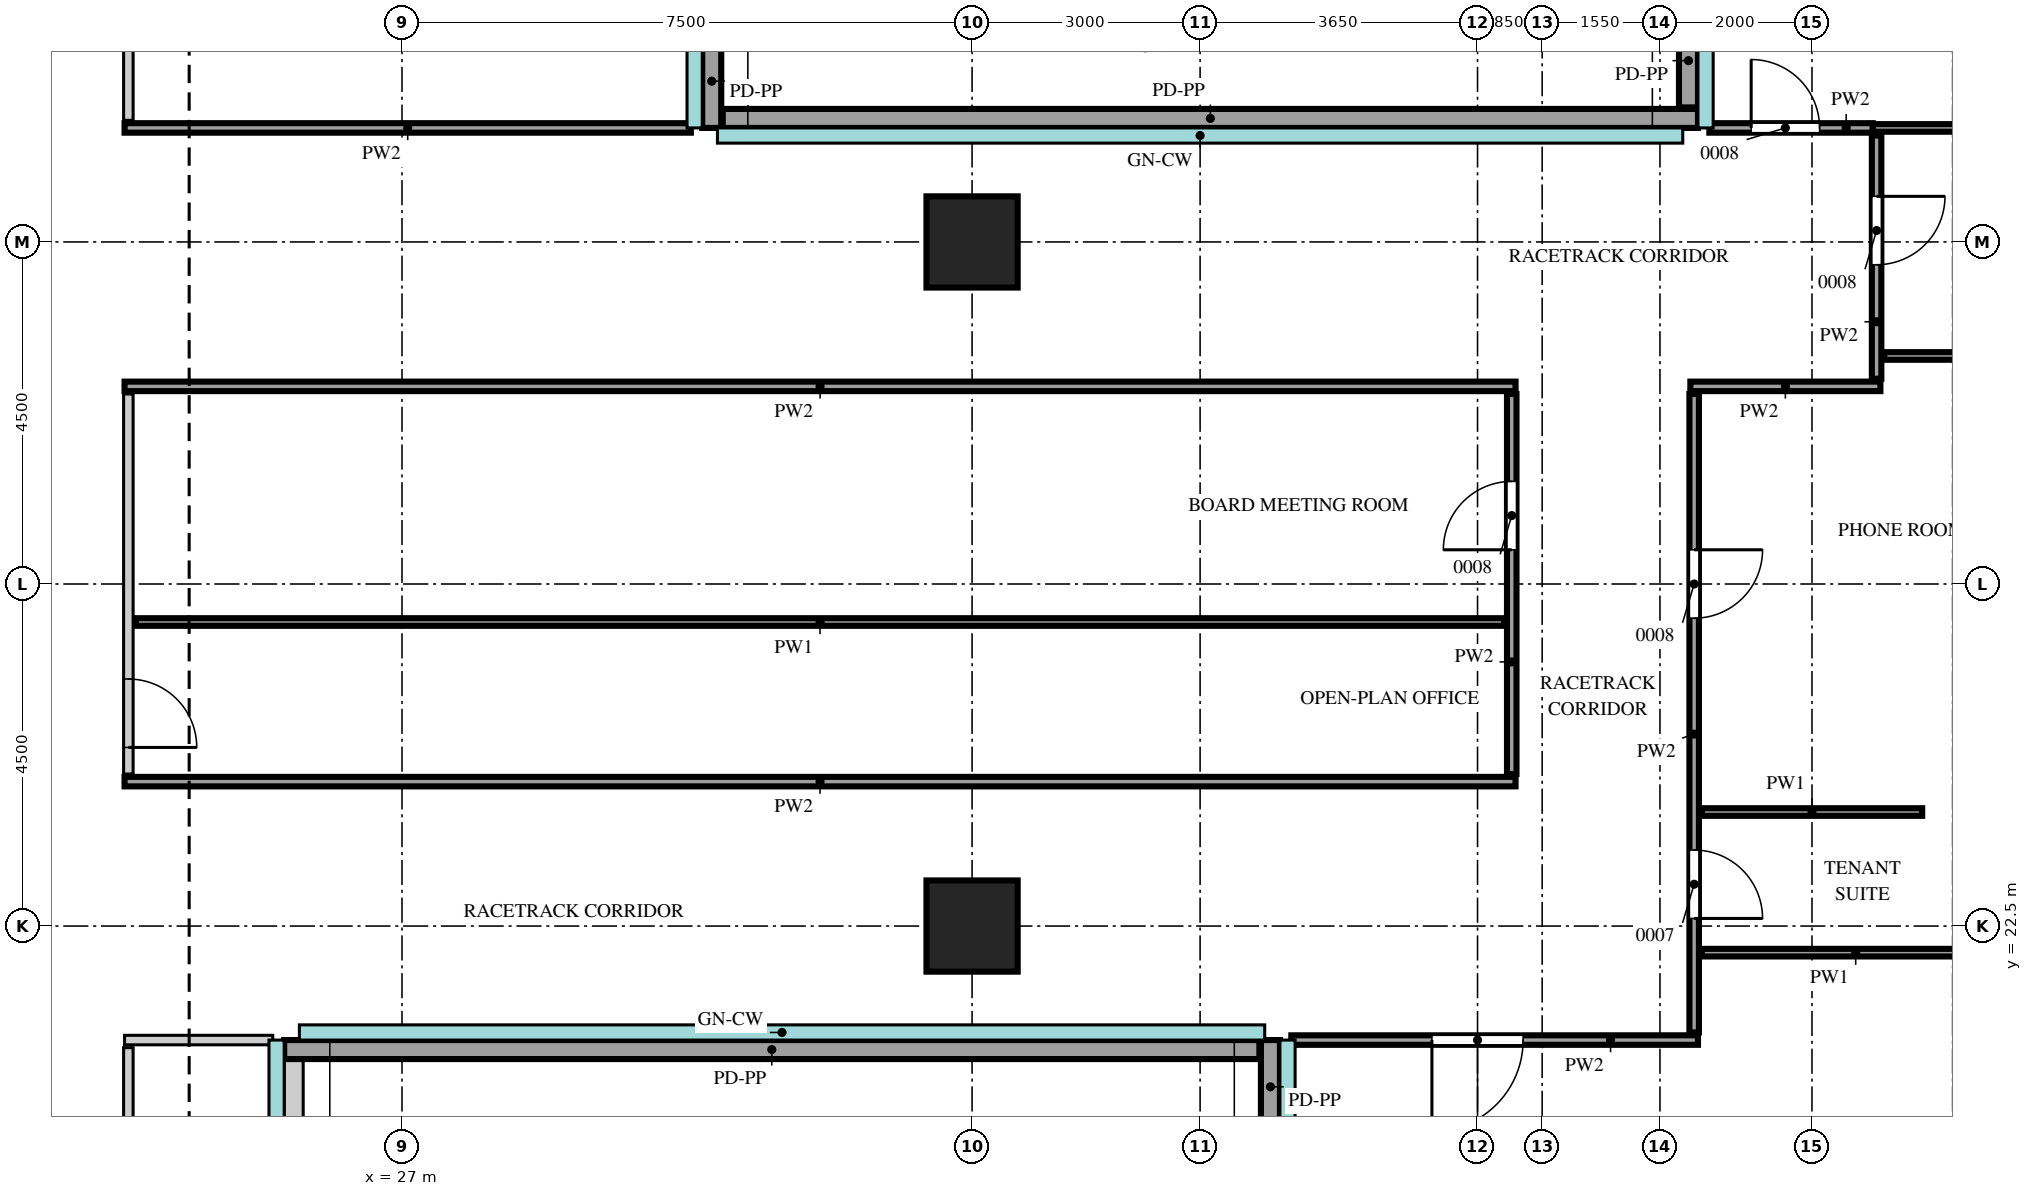
"""IFC4 building model, lengths in metres.
Left out: names, types, materials, properties, quantities, classifications, styles, units other than length and angle.
Written with IfcOpenShell. Run it as: python <this file> out.ifc"""

import sys

from ifc_helpers import new_model, si_unit, direction, frame, frame_2d, origin, origin_2d, place, context, subcontext, project, spatial, rectangle, extrude, source, transform, mapped, element, fill, save


model = new_model("IFC4")
c1 = context("Model", 3, precision=1e-05, world=origin(), true_north=direction((0.0, 1.0)))
c2 = subcontext(c1, "Body", "Model", "MODEL_VIEW")
j1 = project(units=[si_unit("LENGTHUNIT", "METRE"), si_unit("PLANEANGLEUNIT", "RADIAN")], contexts=[c1])
p1 = place(None, origin())
s1 = spatial("IfcSite", under=j1, at=p1, CompositionType="ELEMENT")
p2 = place(p1, origin())
s2 = spatial("IfcBuilding", under=s1, at=p2, CompositionType="ELEMENT")
p3 = place(p2, frame((0.0, 0.0, 164.7)))
s3 = spatial("IfcBuildingStorey", under=s2, at=p3, CompositionType="ELEMENT", Elevation=164.7)
m1 = source(origin(), c2, "Body", "SweptSolid", [
    extrude(rectangle(XDim=1.2, YDim=1.2, at=origin_2d()), origin(), (0.0, 0.0, 1.0), 3.75),
])
for number, where, z_axis, x_axis in (
    (1, (34.5, 22.5, 0.0), (0.0, 0.0, 1.0), (1.0, 0.0, 0.0)),
    (2, (34.5, 31.5, 0.0), (0.0, 0.0, 1.0), (1.0, 0.0, 0.0)),
):
    element("IfcColumn", number, at=place(p3, frame(where, z_axis=z_axis, x_axis=x_axis)), inside=s3, PredefinedType="COLUMN", context=c2, shape_type="MappedRepresentation", body=[
        mapped(m1, transform((0.0, 0.0, 0.0))),
    ])
m2 = source(origin(), c2, "Body", "SweptSolid", [
    extrude(rectangle(XDim=1.23, YDim=0.25, at=frame_2d((0.615, 0.0))), origin(), (0.0, 0.0, 1.0), 1.1),
])
p4 = place(p3, frame((31.075, 34.23, 0.0), z_axis=(0.0, 0.0, 1.0), x_axis=(0.0, -1.0, 0.0)))
e3 = element("IfcWall", 3, at=p4, inside=s3, PredefinedType="SOLIDWALL", context=c2, shape_type="MappedRepresentation", body=[
    mapped(m2, transform((0.0, 0.0, 0.0))),
])
m3 = source(origin(), c2, "Body", "SweptSolid", [
    extrude(rectangle(XDim=12.83, YDim=0.25, at=frame_2d((6.415, 0.0))), origin(), (0.0, 0.0, 1.0), 1.1),
])
p5 = place(p3, frame((31.22, 33.125, 0.0), z_axis=(0.0, 0.0, 1.0), x_axis=(1.0, 0.0, 0.0)))
e4 = element("IfcWall", 4, at=p5, inside=s3, PredefinedType="SOLIDWALL", context=c2, shape_type="MappedRepresentation", body=[
    mapped(m3, transform((0.0, 0.0, 0.0))),
])
for number, where, z_axis, x_axis in (
    (5, (43.925, 33.27, 0.0), (0.0, 0.0, 1.0), (0.0, 1.0, 0.0)),
    (6, (38.425, 19.77, 0.0), (0.0, 0.0, 1.0), (0.0, 1.0, 0.0)),
):
    element("IfcWall", number, at=place(p3, frame(where, z_axis=z_axis, x_axis=x_axis)), inside=s3, PredefinedType="SOLIDWALL", context=c2, shape_type="MappedRepresentation", body=[
        mapped(m2, transform((0.0, 0.0, 0.0))),
    ])
p6 = place(p3, frame((38.28, 20.875, 0.0), z_axis=(0.0, 0.0, 1.0), x_axis=(-1.0, 0.0, 0.0)))
e7 = element("IfcWall", 7, at=p6, inside=s3, PredefinedType="SOLIDWALL", context=c2, shape_type="MappedRepresentation", body=[
    mapped(m3, transform((0.0, 0.0, 0.0))),
])
p7 = place(p3, frame((25.575, 20.73, 0.0), z_axis=(0.0, 0.0, 1.0), x_axis=(0.0, -1.0, 0.0)))
e8 = element("IfcWall", 8, at=p7, inside=s3, PredefinedType="SOLIDWALL", context=c2, shape_type="MappedRepresentation", body=[
    mapped(m2, transform((0.0, 0.0, 0.0))),
])
m4 = source(origin(), c2, "Body", "SweptSolid", [
    extrude(rectangle(XDim=12.45, YDim=0.125, at=frame_2d((6.225, 0.0))), origin(), (0.0, 0.0, 1.0), 3.8),
])
p8 = place(p3, frame((23.4, 8.45, 0.0), z_axis=(0.0, 0.0, 1.0), x_axis=(0.0, 1.0, 0.0)))
e9 = element("IfcWall", 9, at=p8, inside=s3, PredefinedType="PARTITIONING", context=c2, shape_type="MappedRepresentation", body=[
    mapped(m4, transform((0.0, 0.0, 0.0))),
])
m5 = source(origin(), c2, "Body", "SweptSolid", [
    extrude(rectangle(XDim=0.9, YDim=2.1, at=frame_2d((0.45, 1.05))), frame((0.0, 0.073, 0.0), z_axis=(0.0, -1.0, 0.0), x_axis=(1.0, 0.0, 0.0)), (0.0, 0.0, 1.0), 0.145),
])
p9 = place(p8, frame((5.65, 0.0, 0.0)))
e10 = element("IfcOpeningElement", 10, at=p9, cuts=e9, PredefinedType="OPENING", context=c2, shape_type="MappedRepresentation", body=[
    mapped(m5, transform((0.0, 0.0, 0.0))),
])
m6 = source(origin(), c2, "Body", "SweptSolid", [
    extrude(rectangle(XDim=1.95, YDim=0.125, at=frame_2d((0.975, 0.0))), origin(), (0.0, 0.0, 1.0), 3.8),
])
p10 = place(p3, frame((23.35, 21.0, 0.0), z_axis=(0.0, 0.0, 1.0), x_axis=(1.0, 0.0, 0.0)))
e11 = element("IfcWall", 11, at=p10, inside=s3, PredefinedType="PARTITIONING", context=c2, shape_type="MappedRepresentation", body=[
    mapped(m6, transform((0.0, 0.0, 0.0))),
])
m7 = source(origin(), c2, "Body", "SweptSolid", [
    extrude(rectangle(XDim=5.35, YDim=0.125, at=frame_2d((2.675, 0.0))), origin(), (0.0, 0.0, 1.0), 3.8),
])
p11 = place(p3, frame((38.7, 21.0, 0.0), z_axis=(0.0, 0.0, 1.0), x_axis=(1.0, 0.0, 0.0)))
e12 = element("IfcWall", 12, at=p11, inside=s3, PredefinedType="PARTITIONING", context=c2, shape_type="MappedRepresentation", body=[
    mapped(m7, transform((0.0, 0.0, 0.0))),
])
m8 = source(origin(), c2, "Body", "SweptSolid", [
    extrude(rectangle(XDim=1.2, YDim=2.1, at=frame_2d((0.6, 1.05))), frame((0.0, 0.073, 0.0), z_axis=(0.0, -1.0, 0.0), x_axis=(1.0, 0.0, 0.0)), (0.0, 0.0, 1.0), 0.145),
])
p12 = place(p11, frame((1.85, 0.0, 0.0)))
e13 = element("IfcOpeningElement", 13, at=p12, cuts=e12, PredefinedType="OPENING", context=c2, shape_type="MappedRepresentation", body=[
    mapped(m8, transform((0.0, 0.0, 0.0))),
])
m9 = source(origin(), c2, "Body", "SweptSolid", [
    extrude(rectangle(XDim=8.4, YDim=0.125, at=frame_2d((4.2, 0.0))), origin(), (0.0, 0.0, 1.0), 3.8),
])
p13 = place(p3, frame((44.0, 21.1, 0.0), z_axis=(0.0, 0.0, 1.0), x_axis=(0.0, 1.0, 0.0)))
e14 = element("IfcWall", 14, at=p13, inside=s3, PredefinedType="PARTITIONING", context=c2, shape_type="MappedRepresentation", body=[
    mapped(m9, transform((0.0, 0.0, 0.0))),
])
p14 = place(p13, frame((1.5, 0.0, 0.0)))
e15 = element("IfcOpeningElement", 15, at=p14, cuts=e14, PredefinedType="OPENING", context=c2, shape_type="MappedRepresentation", body=[
    mapped(m5, transform((0.0, 0.0, 0.0))),
])
p15 = place(p13, frame((5.45, 0.0, 0.0)))
e16 = element("IfcOpeningElement", 16, at=p15, cuts=e14, PredefinedType="OPENING", context=c2, shape_type="MappedRepresentation", body=[
    mapped(m5, transform((0.0, 0.0, 0.0))),
])
m10 = source(origin(), c2, "Body", "SweptSolid", [
    extrude(rectangle(XDim=4.05, YDim=0.1, at=frame_2d((2.025, 0.0))), origin(), (0.0, 0.0, 1.0), 3.8),
])
p16 = place(p3, frame((44.1, 22.15, 0.0), z_axis=(0.0, 0.0, 1.0), x_axis=(1.0, 0.0, 0.0)))
e17 = element("IfcWall", 17, at=p16, inside=s3, PredefinedType="PARTITIONING", context=c2, shape_type="MappedRepresentation", body=[
    mapped(m10, transform((0.0, 0.0, 0.0))),
])
m11 = source(origin(), c2, "Body", "SweptSolid", [
    extrude(rectangle(XDim=2.9, YDim=0.1, at=frame_2d((1.45, 0.0))), origin(), (0.0, 0.0, 1.0), 3.8),
])
p17 = place(p3, frame((44.1, 24.0, 0.0), z_axis=(0.0, 0.0, 1.0), x_axis=(1.0, 0.0, 0.0)))
e18 = element("IfcWall", 18, at=p17, inside=s3, PredefinedType="PARTITIONING", context=c2, shape_type="MappedRepresentation", body=[
    mapped(m11, transform((0.0, 0.0, 0.0))),
])
m12 = source(origin(), c2, "Body", "SweptSolid", [
    extrude(rectangle(XDim=18.3, YDim=0.125, at=frame_2d((9.15, 0.0))), origin(), (0.0, 0.0, 1.0), 3.8),
])
p18 = place(p3, frame((23.35, 24.4, 0.0), z_axis=(0.0, 0.0, 1.0), x_axis=(1.0, 0.0, 0.0)))
e19 = element("IfcWall", 19, at=p18, inside=s3, PredefinedType="PARTITIONING", context=c2, shape_type="MappedRepresentation", body=[
    mapped(m12, transform((0.0, 0.0, 0.0))),
])
m13 = source(origin(), c2, "Body", "SweptSolid", [
    extrude(rectangle(XDim=5.0, YDim=0.125, at=frame_2d((2.5, 0.0))), origin(), (0.0, 0.0, 1.0), 3.8),
])
p19 = place(p3, frame((23.4, 24.5, 0.0), z_axis=(0.0, 0.0, 1.0), x_axis=(0.0, 1.0, 0.0)))
e20 = element("IfcWall", 20, at=p19, inside=s3, PredefinedType="PARTITIONING", context=c2, shape_type="MappedRepresentation", body=[
    mapped(m13, transform((0.0, 0.0, 0.0))),
])
p20 = place(p19, frame((0.35, 0.0, 0.0)))
e21 = element("IfcOpeningElement", 21, at=p20, cuts=e20, PredefinedType="OPENING", context=c2, shape_type="MappedRepresentation", body=[
    mapped(m5, transform((0.0, 0.0, 0.0))),
])
p21 = place(p3, frame((41.6, 24.5, 0.0), z_axis=(0.0, 0.0, 1.0), x_axis=(0.0, 1.0, 0.0)))
e22 = element("IfcWall", 22, at=p21, inside=s3, PredefinedType="PARTITIONING", context=c2, shape_type="MappedRepresentation", body=[
    mapped(m13, transform((0.0, 0.0, 0.0))),
])
p22 = place(p21, frame((2.95, 0.0, 0.0)))
e23 = element("IfcOpeningElement", 23, at=p22, cuts=e22, PredefinedType="OPENING", context=c2, shape_type="MappedRepresentation", body=[
    mapped(m5, transform((0.0, 0.0, 0.0))),
])
m14 = source(origin(), c2, "Body", "SweptSolid", [
    extrude(rectangle(XDim=18.0, YDim=0.1, at=frame_2d((9.0, 0.0))), origin(), (0.0, 0.0, 1.0), 3.8),
])
p23 = place(p3, frame((23.5, 26.5, 0.0), z_axis=(0.0, 0.0, 1.0), x_axis=(1.0, 0.0, 0.0)))
e24 = element("IfcWall", 24, at=p23, inside=s3, PredefinedType="PARTITIONING", context=c2, shape_type="MappedRepresentation", body=[
    mapped(m14, transform((0.0, 0.0, 0.0))),
])
p24 = place(p3, frame((23.35, 29.6, 0.0), z_axis=(0.0, 0.0, 1.0), x_axis=(1.0, 0.0, 0.0)))
e25 = element("IfcWall", 25, at=p24, inside=s3, PredefinedType="PARTITIONING", context=c2, shape_type="MappedRepresentation", body=[
    mapped(m12, transform((0.0, 0.0, 0.0))),
])
m15 = source(origin(), c2, "Body", "SweptSolid", [
    extrude(rectangle(XDim=2.5, YDim=0.125, at=frame_2d((1.25, 0.0))), origin(), (0.0, 0.0, 1.0), 3.8),
])
p25 = place(p3, frame((43.95, 29.6, 0.0), z_axis=(0.0, 0.0, 1.0), x_axis=(1.0, 0.0, 0.0)))
e26 = element("IfcWall", 26, at=p25, inside=s3, PredefinedType="PARTITIONING", context=c2, shape_type="MappedRepresentation", body=[
    mapped(m15, transform((0.0, 0.0, 0.0))),
])
m16 = source(origin(), c2, "Body", "SweptSolid", [
    extrude(rectangle(XDim=3.2, YDim=0.125, at=frame_2d((1.6, 0.0))), origin(), (0.0, 0.0, 1.0), 3.8),
])
p26 = place(p3, frame((46.4, 29.7, 0.0), z_axis=(0.0, 0.0, 1.0), x_axis=(0.0, 1.0, 0.0)))
e27 = element("IfcWall", 27, at=p26, inside=s3, PredefinedType="PARTITIONING", context=c2, shape_type="MappedRepresentation", body=[
    mapped(m16, transform((0.0, 0.0, 0.0))),
])
p27 = place(p26, frame((1.5, 0.0, 0.0)))
e28 = element("IfcOpeningElement", 28, at=p27, cuts=e27, PredefinedType="OPENING", context=c2, shape_type="MappedRepresentation", body=[
    mapped(m5, transform((0.0, 0.0, 0.0))),
])
m17 = source(origin(), c2, "Body", "SweptSolid", [
    extrude(rectangle(XDim=4.35, YDim=0.1, at=frame_2d((2.175, 0.0))), origin(), (0.0, 0.0, 1.0), 3.8),
])
p28 = place(p3, frame((46.5, 30.0, 0.0), z_axis=(0.0, 0.0, 1.0), x_axis=(1.0, 0.0, 0.0)))
e29 = element("IfcWall", 29, at=p28, inside=s3, PredefinedType="PARTITIONING", context=c2, shape_type="MappedRepresentation", body=[
    mapped(m17, transform((0.0, 0.0, 0.0))),
])
m18 = source(origin(), c2, "Body", "SweptSolid", [
    extrude(rectangle(XDim=7.45, YDim=0.125, at=frame_2d((3.725, 0.0))), origin(), (0.0, 0.0, 1.0), 3.8),
])
p29 = place(p3, frame((23.35, 33.0, 0.0), z_axis=(0.0, 0.0, 1.0), x_axis=(1.0, 0.0, 0.0)))
e30 = element("IfcWall", 30, at=p29, inside=s3, PredefinedType="PARTITIONING", context=c2, shape_type="MappedRepresentation", body=[
    mapped(m18, transform((0.0, 0.0, 0.0))),
])
m19 = source(origin(), c2, "Body", "SweptSolid", [
    extrude(rectangle(XDim=2.15, YDim=0.125, at=frame_2d((1.075, 0.0))), origin(), (0.0, 0.0, 1.0), 3.8),
])
p30 = place(p3, frame((44.2, 33.0, 0.0), z_axis=(0.0, 0.0, 1.0), x_axis=(1.0, 0.0, 0.0)))
e31 = element("IfcWall", 31, at=p30, inside=s3, PredefinedType="PARTITIONING", context=c2, shape_type="MappedRepresentation", body=[
    mapped(m19, transform((0.0, 0.0, 0.0))),
])
p31 = place(p30, frame((0.55, 0.0, 0.0)))
e32 = element("IfcOpeningElement", 32, at=p31, cuts=e31, PredefinedType="OPENING", context=c2, shape_type="MappedRepresentation", body=[
    mapped(m5, transform((0.0, 0.0, 0.0))),
])
m20 = source(origin(), c2, "Body", "SweptSolid", [
    extrude(rectangle(XDim=4.5, YDim=0.1, at=frame_2d((2.25, 0.0))), origin(), (0.0, 0.0, 1.0), 3.8),
])
p32 = place(p3, frame((46.35, 33.0, 0.0), z_axis=(0.0, 0.0, 1.0), x_axis=(1.0, 0.0, 0.0)))
e33 = element("IfcWall", 33, at=p32, inside=s3, PredefinedType="PARTITIONING", context=c2, shape_type="MappedRepresentation", body=[
    mapped(m20, transform((0.0, 0.0, 0.0))),
])
m21 = source(origin(), c2, "Body", "SweptSolid", [
    extrude(rectangle(XDim=6.3, YDim=0.125, at=frame_2d((3.15, 0.0))), origin(), (0.0, 0.0, 1.0), 3.8),
])
p33 = place(p3, frame((23.4, 33.1, 0.0), z_axis=(0.0, 0.0, 1.0), x_axis=(0.0, 1.0, 0.0)))
e34 = element("IfcWall", 34, at=p33, inside=s3, PredefinedType="PARTITIONING", context=c2, shape_type="MappedRepresentation", body=[
    mapped(m21, transform((0.0, 0.0, 0.0))),
])
m22 = source(origin(), c2, "Body", "SweptSolid", [
    extrude(rectangle(XDim=1.2, YDim=2.1, at=frame_2d((0.6, 1.05))), frame((0.0, 0.025, 0.0), z_axis=(0.0, -1.0, 0.0), x_axis=(1.0, 0.0, 0.0)), (0.0, 0.0, 1.0), 0.05),
])
p34 = place(p12, origin())
e35 = element("IfcDoor", 35, at=p34, inside=s3, OperationType="SINGLE_SWING_LEFT", PredefinedType="DOOR", context=c2, shape_type="MappedRepresentation", body=[
    mapped(m22, transform((0.0, 0.0, 0.0))),
])
fill(e13, e35)
m23 = source(origin(), c2, "Body", "SweptSolid", [
    extrude(rectangle(XDim=0.9, YDim=2.1, at=frame_2d((0.45, 1.05))), frame((0.0, 0.025, 0.0), z_axis=(0.0, -1.0, 0.0), x_axis=(1.0, 0.0, 0.0)), (0.0, 0.0, 1.0), 0.05),
])
p35 = place(p31, origin())
e36 = element("IfcDoor", 36, at=p35, inside=s3, OperationType="SINGLE_SWING_RIGHT", PredefinedType="DOOR", context=c2, shape_type="MappedRepresentation", body=[
    mapped(m23, transform((0.0, 0.0, 0.0))),
])
fill(e32, e36)
p36 = place(p14, origin())
e37 = element("IfcDoor", 37, at=p36, inside=s3, OperationType="SINGLE_SWING_LEFT", PredefinedType="DOOR", context=c2, shape_type="MappedRepresentation", body=[
    mapped(m23, transform((0.0, 0.0, 0.0))),
])
fill(e15, e37)
p37 = place(p15, origin())
e38 = element("IfcDoor", 38, at=p37, inside=s3, OperationType="SINGLE_SWING_RIGHT", PredefinedType="DOOR", context=c2, shape_type="MappedRepresentation", body=[
    mapped(m23, transform((0.0, 0.0, 0.0))),
])
fill(e16, e38)
p38 = place(p27, origin())
e39 = element("IfcDoor", 39, at=p38, inside=s3, OperationType="SINGLE_SWING_RIGHT", PredefinedType="DOOR", context=c2, shape_type="MappedRepresentation", body=[
    mapped(m23, transform((0.0, 0.0, 0.0))),
])
fill(e28, e39)
p39 = place(p20, origin())
e40 = element("IfcDoor", 40, at=p39, inside=s3, OperationType="SINGLE_SWING_LEFT", PredefinedType="DOOR", context=c2, shape_type="MappedRepresentation", body=[
    mapped(m23, transform((0.0, 0.0, 0.0))),
])
fill(e21, e40)
p40 = place(p22, origin())
e41 = element("IfcDoor", 41, at=p40, inside=s3, OperationType="SINGLE_SWING_RIGHT", PredefinedType="DOOR", context=c2, shape_type="MappedRepresentation", body=[
    mapped(m23, transform((0.0, 0.0, 0.0))),
])
fill(e23, e41)
save(model, sys.argv[1])
